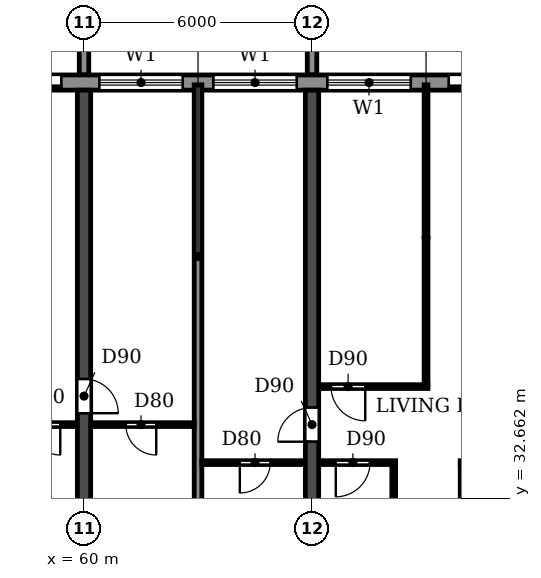
"""IFC4 building model, lengths in metres.
Left out: names, types, materials, properties, quantities, classifications, styles, units other than length and angle.
Written with IfcOpenShell. Run it as: python <this file> out.ifc"""

import sys

from ifc_helpers import new_model, si_unit, direction, frame, frame_2d, origin, place, context, subcontext, project, spatial, polyline, rectangle, outline, extrude, source, transform, mapped, element, fill, save


model = new_model("IFC4")
c1 = context("Model", 3, precision=1e-05, world=origin(), true_north=direction((0.0, 1.0)))
c2 = subcontext(c1, "Body", "Model", "MODEL_VIEW")
j1 = project(units=[si_unit("LENGTHUNIT", "METRE"), si_unit("PLANEANGLEUNIT", "RADIAN")], contexts=[c1])
p1 = place(None, origin())
s1 = spatial("IfcSite", under=j1, at=p1, CompositionType="ELEMENT")
p2 = place(p1, origin())
s2 = spatial("IfcBuilding", under=s1, at=p2, CompositionType="ELEMENT")
p3 = place(p2, frame((0.0, 0.0, 72.9)))
s3 = spatial("IfcBuildingStorey", under=s2, at=p3, CompositionType="ELEMENT", Elevation=72.9)
p4 = place(p3, frame((60.0, 30.525, 0.0), z_axis=(0.0, 0.0, 1.0), x_axis=(0.0, 1.0, 0.0)))
e1 = element("IfcWall", 1, at=p4, inside=s3, PredefinedType="SHEAR", context=c2, shape_type="SweptSolid", body=[
    extrude(rectangle(XDim=12.875, YDim=0.35, at=frame_2d((6.438, 0.0))), origin(), (0.0, 0.0, 1.0), 3.06),
])
p5 = place(p4, frame((4.375, 0.0, 0.0)))
e2 = element("IfcOpeningElement", 2, at=p5, cuts=e1, PredefinedType="OPENING", context=c2, shape_type="SweptSolid", body=[
    extrude(rectangle(XDim=0.9, YDim=2.1, at=frame_2d((0.45, 1.05))), frame((0.0, 0.185, 0.0), z_axis=(0.0, -1.0, 0.0), x_axis=(1.0, 0.0, 0.0)), (0.0, 0.0, 1.0), 0.37),
])
p6 = place(p3, frame((66.0, 30.525, 0.0), z_axis=(0.0, 0.0, 1.0), x_axis=(0.0, 1.0, 0.0)))
e3 = element("IfcWall", 3, at=p6, inside=s3, PredefinedType="SHEAR", context=c2, shape_type="SweptSolid", body=[
    extrude(rectangle(XDim=12.875, YDim=0.35, at=frame_2d((6.438, 0.0))), origin(), (0.0, 0.0, 1.0), 3.06),
])
p7 = place(p6, frame((3.625, 0.0, 0.0)))
e4 = element("IfcOpeningElement", 4, at=p7, cuts=e3, PredefinedType="OPENING", context=c2, shape_type="SweptSolid", body=[
    extrude(rectangle(XDim=0.9, YDim=2.1, at=frame_2d((0.45, 1.05))), frame((0.0, 0.185, 0.0), z_axis=(0.0, -1.0, 0.0), x_axis=(1.0, 0.0, 0.0)), (0.0, 0.0, 1.0), 0.37),
])
p8 = place(p3, frame((91.317, 43.6, 0.0), z_axis=(0.0, 0.0, 1.0), x_axis=(-1.0, 0.0, 0.0)))
e5 = element("IfcWall", 5, at=p8, inside=s3, PredefinedType="STANDARD", context=c2, shape_type="SweptSolid", body=[
    extrude(rectangle(XDim=80.634, YDim=0.4, at=frame_2d((40.317, 0.0))), origin(), (0.0, 0.0, 1.0), 3.06),
])
p9 = place(p8, frame((76.717, 0.0, 0.9)))
e6 = element("IfcOpeningElement", 6, at=p9, cuts=e5, PredefinedType="OPENING", context=c2, shape_type="SweptSolid", body=[
    extrude(rectangle(XDim=2.2, YDim=1.5, at=frame_2d((1.1, 0.75))), frame((0.0, 0.21, 0.0), z_axis=(0.0, -1.0, 0.0), x_axis=(1.0, 0.0, 0.0)), (0.0, 0.0, 1.0), 0.42),
])
p10 = place(p8, frame((73.917, 0.0, 0.0)))
e7 = element("IfcOpeningElement", 7, at=p10, cuts=e5, PredefinedType="OPENING", context=c2, shape_type="SweptSolid", body=[
    extrude(rectangle(XDim=1.8, YDim=2.4, at=frame_2d((0.9, 1.2))), frame((0.0, 0.21, 0.0), z_axis=(0.0, -1.0, 0.0), x_axis=(1.0, 0.0, 0.0)), (0.0, 0.0, 1.0), 0.42),
])
p11 = place(p8, frame((70.917, 0.0, 0.0)))
e8 = element("IfcOpeningElement", 8, at=p11, cuts=e5, PredefinedType="OPENING", context=c2, shape_type="SweptSolid", body=[
    extrude(rectangle(XDim=1.8, YDim=2.4, at=frame_2d((0.9, 1.2))), frame((0.0, 0.21, 0.0), z_axis=(0.0, -1.0, 0.0), x_axis=(1.0, 0.0, 0.0)), (0.0, 0.0, 1.0), 0.42),
])
p12 = place(p8, frame((67.717, 0.0, 0.9)))
e9 = element("IfcOpeningElement", 9, at=p12, cuts=e5, PredefinedType="OPENING", context=c2, shape_type="SweptSolid", body=[
    extrude(rectangle(XDim=2.2, YDim=1.5, at=frame_2d((1.1, 0.75))), frame((0.0, 0.21, 0.0), z_axis=(0.0, -1.0, 0.0), x_axis=(1.0, 0.0, 0.0)), (0.0, 0.0, 1.0), 0.42),
])
p13 = place(p8, frame((64.717, 0.0, 0.9)))
e10 = element("IfcOpeningElement", 10, at=p13, cuts=e5, PredefinedType="OPENING", context=c2, shape_type="SweptSolid", body=[
    extrude(rectangle(XDim=2.2, YDim=1.5, at=frame_2d((1.1, 0.75))), frame((0.0, 0.21, 0.0), z_axis=(0.0, -1.0, 0.0), x_axis=(1.0, 0.0, 0.0)), (0.0, 0.0, 1.0), 0.42),
])
p14 = place(p8, frame((61.917, 0.0, 0.0)))
e11 = element("IfcOpeningElement", 11, at=p14, cuts=e5, PredefinedType="OPENING", context=c2, shape_type="SweptSolid", body=[
    extrude(rectangle(XDim=1.8, YDim=2.4, at=frame_2d((0.9, 1.2))), frame((0.0, 0.21, 0.0), z_axis=(0.0, -1.0, 0.0), x_axis=(1.0, 0.0, 0.0)), (0.0, 0.0, 1.0), 0.42),
])
p15 = place(p8, frame((58.717, 0.0, 0.9)))
e12 = element("IfcOpeningElement", 12, at=p15, cuts=e5, PredefinedType="OPENING", context=c2, shape_type="SweptSolid", body=[
    extrude(rectangle(XDim=2.2, YDim=1.5, at=frame_2d((1.1, 0.75))), frame((0.0, 0.21, 0.0), z_axis=(0.0, -1.0, 0.0), x_axis=(1.0, 0.0, 0.0)), (0.0, 0.0, 1.0), 0.42),
])
p16 = place(p8, frame((55.917, 0.0, 0.0)))
e13 = element("IfcOpeningElement", 13, at=p16, cuts=e5, PredefinedType="OPENING", context=c2, shape_type="SweptSolid", body=[
    extrude(rectangle(XDim=1.8, YDim=2.4, at=frame_2d((0.9, 1.2))), frame((0.0, 0.21, 0.0), z_axis=(0.0, -1.0, 0.0), x_axis=(1.0, 0.0, 0.0)), (0.0, 0.0, 1.0), 0.42),
])
p17 = place(p8, frame((52.717, 0.0, 0.9)))
e14 = element("IfcOpeningElement", 14, at=p17, cuts=e5, PredefinedType="OPENING", context=c2, shape_type="SweptSolid", body=[
    extrude(rectangle(XDim=2.2, YDim=1.5, at=frame_2d((1.1, 0.75))), frame((0.0, 0.21, 0.0), z_axis=(0.0, -1.0, 0.0), x_axis=(1.0, 0.0, 0.0)), (0.0, 0.0, 1.0), 0.42),
])
p18 = place(p8, frame((49.717, 0.0, 0.9)))
e15 = element("IfcOpeningElement", 15, at=p18, cuts=e5, PredefinedType="OPENING", context=c2, shape_type="SweptSolid", body=[
    extrude(rectangle(XDim=2.2, YDim=1.5, at=frame_2d((1.1, 0.75))), frame((0.0, 0.21, 0.0), z_axis=(0.0, -1.0, 0.0), x_axis=(1.0, 0.0, 0.0)), (0.0, 0.0, 1.0), 0.42),
])
p19 = place(p8, frame((46.917, 0.0, 0.0)))
e16 = element("IfcOpeningElement", 16, at=p19, cuts=e5, PredefinedType="OPENING", context=c2, shape_type="SweptSolid", body=[
    extrude(rectangle(XDim=1.8, YDim=2.4, at=frame_2d((0.9, 1.2))), frame((0.0, 0.21, 0.0), z_axis=(0.0, -1.0, 0.0), x_axis=(1.0, 0.0, 0.0)), (0.0, 0.0, 1.0), 0.42),
])
p20 = place(p8, frame((43.717, 0.0, 0.9)))
e17 = element("IfcOpeningElement", 17, at=p20, cuts=e5, PredefinedType="OPENING", context=c2, shape_type="SweptSolid", body=[
    extrude(rectangle(XDim=2.2, YDim=1.5, at=frame_2d((1.1, 0.75))), frame((0.0, 0.21, 0.0), z_axis=(0.0, -1.0, 0.0), x_axis=(1.0, 0.0, 0.0)), (0.0, 0.0, 1.0), 0.42),
])
p21 = place(p8, frame((40.717, 0.0, 0.9)))
e18 = element("IfcOpeningElement", 18, at=p21, cuts=e5, PredefinedType="OPENING", context=c2, shape_type="SweptSolid", body=[
    extrude(rectangle(XDim=2.2, YDim=1.5, at=frame_2d((1.1, 0.75))), frame((0.0, 0.21, 0.0), z_axis=(0.0, -1.0, 0.0), x_axis=(1.0, 0.0, 0.0)), (0.0, 0.0, 1.0), 0.42),
])
p22 = place(p8, frame((37.917, 0.0, 0.0)))
e19 = element("IfcOpeningElement", 19, at=p22, cuts=e5, PredefinedType="OPENING", context=c2, shape_type="SweptSolid", body=[
    extrude(rectangle(XDim=1.8, YDim=2.4, at=frame_2d((0.9, 1.2))), frame((0.0, 0.21, 0.0), z_axis=(0.0, -1.0, 0.0), x_axis=(1.0, 0.0, 0.0)), (0.0, 0.0, 1.0), 0.42),
])
p23 = place(p8, frame((34.717, 0.0, 0.9)))
e20 = element("IfcOpeningElement", 20, at=p23, cuts=e5, PredefinedType="OPENING", context=c2, shape_type="SweptSolid", body=[
    extrude(rectangle(XDim=2.2, YDim=1.5, at=frame_2d((1.1, 0.75))), frame((0.0, 0.21, 0.0), z_axis=(0.0, -1.0, 0.0), x_axis=(1.0, 0.0, 0.0)), (0.0, 0.0, 1.0), 0.42),
])
p24 = place(p8, frame((31.917, 0.0, 0.0)))
e21 = element("IfcOpeningElement", 21, at=p24, cuts=e5, PredefinedType="OPENING", context=c2, shape_type="SweptSolid", body=[
    extrude(rectangle(XDim=1.8, YDim=2.4, at=frame_2d((0.9, 1.2))), frame((0.0, 0.21, 0.0), z_axis=(0.0, -1.0, 0.0), x_axis=(1.0, 0.0, 0.0)), (0.0, 0.0, 1.0), 0.42),
])
p25 = place(p8, frame((28.717, 0.0, 0.9)))
e22 = element("IfcOpeningElement", 22, at=p25, cuts=e5, PredefinedType="OPENING", context=c2, shape_type="SweptSolid", body=[
    extrude(rectangle(XDim=2.2, YDim=1.5, at=frame_2d((1.1, 0.75))), frame((0.0, 0.21, 0.0), z_axis=(0.0, -1.0, 0.0), x_axis=(1.0, 0.0, 0.0)), (0.0, 0.0, 1.0), 0.42),
])
p26 = place(p8, frame((25.717, 0.0, 0.9)))
e23 = element("IfcOpeningElement", 23, at=p26, cuts=e5, PredefinedType="OPENING", context=c2, shape_type="SweptSolid", body=[
    extrude(rectangle(XDim=2.2, YDim=1.5, at=frame_2d((1.1, 0.75))), frame((0.0, 0.21, 0.0), z_axis=(0.0, -1.0, 0.0), x_axis=(1.0, 0.0, 0.0)), (0.0, 0.0, 1.0), 0.42),
])
p27 = place(p8, frame((22.717, 0.0, 0.9)))
e24 = element("IfcOpeningElement", 24, at=p27, cuts=e5, PredefinedType="OPENING", context=c2, shape_type="SweptSolid", body=[
    extrude(rectangle(XDim=2.2, YDim=1.5, at=frame_2d((1.1, 0.75))), frame((0.0, 0.21, 0.0), z_axis=(0.0, -1.0, 0.0), x_axis=(1.0, 0.0, 0.0)), (0.0, 0.0, 1.0), 0.42),
])
p28 = place(p8, frame((19.917, 0.0, 0.0)))
e25 = element("IfcOpeningElement", 25, at=p28, cuts=e5, PredefinedType="OPENING", context=c2, shape_type="SweptSolid", body=[
    extrude(rectangle(XDim=1.8, YDim=2.4, at=frame_2d((0.9, 1.2))), frame((0.0, 0.21, 0.0), z_axis=(0.0, -1.0, 0.0), x_axis=(1.0, 0.0, 0.0)), (0.0, 0.0, 1.0), 0.42),
])
p29 = place(p8, frame((16.717, 0.0, 0.9)))
e26 = element("IfcOpeningElement", 26, at=p29, cuts=e5, PredefinedType="OPENING", context=c2, shape_type="SweptSolid", body=[
    extrude(rectangle(XDim=2.2, YDim=1.5, at=frame_2d((1.1, 0.75))), frame((0.0, 0.21, 0.0), z_axis=(0.0, -1.0, 0.0), x_axis=(1.0, 0.0, 0.0)), (0.0, 0.0, 1.0), 0.42),
])
p30 = place(p8, frame((13.717, 0.0, 0.9)))
e27 = element("IfcOpeningElement", 27, at=p30, cuts=e5, PredefinedType="OPENING", context=c2, shape_type="SweptSolid", body=[
    extrude(rectangle(XDim=2.2, YDim=1.5, at=frame_2d((1.1, 0.75))), frame((0.0, 0.21, 0.0), z_axis=(0.0, -1.0, 0.0), x_axis=(1.0, 0.0, 0.0)), (0.0, 0.0, 1.0), 0.42),
])
p31 = place(p8, frame((10.717, 0.0, 0.9)))
e28 = element("IfcOpeningElement", 28, at=p31, cuts=e5, PredefinedType="OPENING", context=c2, shape_type="SweptSolid", body=[
    extrude(rectangle(XDim=2.2, YDim=1.5, at=frame_2d((1.1, 0.75))), frame((0.0, 0.21, 0.0), z_axis=(0.0, -1.0, 0.0), x_axis=(1.0, 0.0, 0.0)), (0.0, 0.0, 1.0), 0.42),
])
p32 = place(p8, frame((7.917, 0.0, 0.0)))
e29 = element("IfcOpeningElement", 29, at=p32, cuts=e5, PredefinedType="OPENING", context=c2, shape_type="SweptSolid", body=[
    extrude(rectangle(XDim=1.8, YDim=2.4, at=frame_2d((0.9, 1.2))), frame((0.0, 0.21, 0.0), z_axis=(0.0, -1.0, 0.0), x_axis=(1.0, 0.0, 0.0)), (0.0, 0.0, 1.0), 0.42),
])
p33 = place(p8, frame((4.717, 0.0, 0.9)))
e30 = element("IfcOpeningElement", 30, at=p33, cuts=e5, PredefinedType="OPENING", context=c2, shape_type="SweptSolid", body=[
    extrude(rectangle(XDim=2.2, YDim=1.5, at=frame_2d((1.1, 0.75))), frame((0.0, 0.21, 0.0), z_axis=(0.0, -1.0, 0.0), x_axis=(1.0, 0.0, 0.0)), (0.0, 0.0, 1.0), 0.42),
])
p34 = place(p8, frame((1.917, 0.0, 0.0)))
e31 = element("IfcOpeningElement", 31, at=p34, cuts=e5, PredefinedType="OPENING", context=c2, shape_type="SweptSolid", body=[
    extrude(rectangle(XDim=1.8, YDim=2.4, at=frame_2d((0.9, 1.2))), frame((0.0, 0.21, 0.0), z_axis=(0.0, -1.0, 0.0), x_axis=(1.0, 0.0, 0.0)), (0.0, 0.0, 1.0), 0.42),
])
m1 = source(origin(), c2, "Body", "SweptSolid", [
    extrude(outline(polyline([(0.0, 0.0), (0.25, 0.0), (0.25, 3.1), (0.0, 3.1), (0.0, 0.0)])), origin(), (0.0, 0.0, 1.0), 3.1),
])
for number, where in (
    (32, (59.875, 43.8, 0.0)),
    (33, (65.875, 43.8, 0.0)),
):
    element("IfcWall", number, at=place(p3, frame(where)), inside=s3, PredefinedType="STANDARD", context=c2, shape_type="MappedRepresentation", body=[
        mapped(m1, transform((0.0, 0.0, 0.0))),
    ])
p35 = place(p3, frame((63.0, 30.535, 0.0), z_axis=(0.0, 0.0, 1.0), x_axis=(0.0, 1.0, 0.0)))
e34 = element("IfcWall", 34, at=p35, inside=s3, PredefinedType="PARTITIONING", context=c2, shape_type="SweptSolid", body=[
    extrude(rectangle(XDim=13.005, YDim=0.2, at=frame_2d((6.502, 0.0))), origin(), (0.0, 0.0, 1.0), 3.06),
])
p36 = place(p3, frame((63.1, 33.6, 0.0), z_axis=(0.0, 0.0, 1.0), x_axis=(1.0, 0.0, 0.0)))
e35 = element("IfcWall", 35, at=p36, inside=s3, PredefinedType="PARTITIONING", context=c2, shape_type="SweptSolid", body=[
    extrude(rectangle(XDim=2.715, YDim=0.1, at=frame_2d((1.357, 0.0))), origin(), (0.0, 0.0, 1.0), 3.06),
])
p37 = place(p36, frame((1.0, 0.0, 0.0)))
e36 = element("IfcOpeningElement", 36, at=p37, cuts=e35, PredefinedType="OPENING", context=c2, shape_type="SweptSolid", body=[
    extrude(rectangle(XDim=0.8, YDim=2.1, at=frame_2d((0.4, 1.05))), frame((0.0, 0.06, 0.0), z_axis=(0.0, -1.0, 0.0), x_axis=(1.0, 0.0, 0.0)), (0.0, 0.0, 1.0), 0.12),
])
p38 = place(p3, frame((66.185, 33.6, 0.0), z_axis=(0.0, 0.0, 1.0), x_axis=(1.0, 0.0, 0.0)))
e37 = element("IfcWall", 37, at=p38, inside=s3, PredefinedType="PARTITIONING", context=c2, shape_type="SweptSolid", body=[
    extrude(rectangle(XDim=2.015, YDim=0.1, at=frame_2d((1.007, 0.0))), origin(), (0.0, 0.0, 1.0), 3.06),
])
p39 = place(p38, frame((0.44, 0.0, 0.0)))
e38 = element("IfcOpeningElement", 38, at=p39, cuts=e37, PredefinedType="OPENING", context=c2, shape_type="SweptSolid", body=[
    extrude(rectangle(XDim=0.9, YDim=2.1, at=frame_2d((0.45, 1.05))), frame((0.0, 0.06, 0.0), z_axis=(0.0, -1.0, 0.0), x_axis=(1.0, 0.0, 0.0)), (0.0, 0.0, 1.0), 0.12),
])
p40 = place(p3, frame((69.9, 33.6, 0.0), z_axis=(0.0, 0.0, 1.0), x_axis=(1.0, 0.0, 0.0)))
e39 = element("IfcWall", 39, at=p40, inside=s3, PredefinedType="PARTITIONING", context=c2, shape_type="SweptSolid", body=[
    extrude(rectangle(XDim=1.915, YDim=0.1, at=frame_2d((0.958, 0.0))), origin(), (0.0, 0.0, 1.0), 3.06),
])
p41 = place(p40, frame((0.675, 0.0, 0.0)))
e40 = element("IfcOpeningElement", 40, at=p41, cuts=e39, PredefinedType="OPENING", context=c2, shape_type="SweptSolid", body=[
    extrude(rectangle(XDim=0.8, YDim=2.1, at=frame_2d((0.4, 1.05))), frame((0.0, 0.06, 0.0), z_axis=(0.0, -1.0, 0.0), x_axis=(1.0, 0.0, 0.0)), (0.0, 0.0, 1.0), 0.12),
])
p42 = place(p3, frame((57.9, 34.6, 0.0), z_axis=(0.0, 0.0, 1.0), x_axis=(1.0, 0.0, 0.0)))
e41 = element("IfcWall", 41, at=p42, inside=s3, PredefinedType="PARTITIONING", context=c2, shape_type="SweptSolid", body=[
    extrude(rectangle(XDim=1.915, YDim=0.1, at=frame_2d((0.958, 0.0))), origin(), (0.0, 0.0, 1.0), 3.06),
])
p43 = place(p42, frame((0.675, 0.0, 0.0)))
e42 = element("IfcOpeningElement", 42, at=p43, cuts=e41, PredefinedType="OPENING", context=c2, shape_type="SweptSolid", body=[
    extrude(rectangle(XDim=0.8, YDim=2.1, at=frame_2d((0.4, 1.05))), frame((0.0, 0.06, 0.0), z_axis=(0.0, -1.0, 0.0), x_axis=(1.0, 0.0, 0.0)), (0.0, 0.0, 1.0), 0.12),
])
p44 = place(p3, frame((60.185, 34.6, 0.0), z_axis=(0.0, 0.0, 1.0), x_axis=(1.0, 0.0, 0.0)))
e43 = element("IfcWall", 43, at=p44, inside=s3, PredefinedType="PARTITIONING", context=c2, shape_type="SweptSolid", body=[
    extrude(rectangle(XDim=2.715, YDim=0.1, at=frame_2d((1.357, 0.0))), origin(), (0.0, 0.0, 1.0), 3.06),
])
p45 = place(p44, frame((0.915, 0.0, 0.0)))
e44 = element("IfcOpeningElement", 44, at=p45, cuts=e43, PredefinedType="OPENING", context=c2, shape_type="SweptSolid", body=[
    extrude(rectangle(XDim=0.8, YDim=2.1, at=frame_2d((0.4, 1.05))), frame((0.0, 0.06, 0.0), z_axis=(0.0, -1.0, 0.0), x_axis=(1.0, 0.0, 0.0)), (0.0, 0.0, 1.0), 0.12),
])
p46 = place(p3, frame((66.185, 35.6, 0.0), z_axis=(0.0, 0.0, 1.0), x_axis=(1.0, 0.0, 0.0)))
e45 = element("IfcWall", 45, at=p46, inside=s3, PredefinedType="PARTITIONING", context=c2, shape_type="SweptSolid", body=[
    extrude(rectangle(XDim=2.865, YDim=0.1, at=frame_2d((1.433, 0.0))), origin(), (0.0, 0.0, 1.0), 3.06),
])
p47 = place(p46, frame((0.315, 0.0, 0.0)))
e46 = element("IfcOpeningElement", 46, at=p47, cuts=e45, PredefinedType="OPENING", context=c2, shape_type="SweptSolid", body=[
    extrude(rectangle(XDim=0.9, YDim=2.1, at=frame_2d((0.45, 1.05))), frame((0.0, 0.06, 0.0), z_axis=(0.0, -1.0, 0.0), x_axis=(1.0, 0.0, 0.0)), (0.0, 0.0, 1.0), 0.12),
])
p48 = place(p3, frame((68.15, 30.535, 0.0), z_axis=(0.0, 0.0, 1.0), x_axis=(0.0, 1.0, 0.0)))
e47 = element("IfcWall", 47, at=p48, inside=s3, PredefinedType="PARTITIONING", context=c2, shape_type="SweptSolid", body=[
    extrude(rectangle(XDim=3.015, YDim=0.1, at=frame_2d((1.508, 0.0))), origin(), (0.0, 0.0, 1.0), 3.06),
])
p49 = place(p3, frame((69.0, 35.65, 0.0), z_axis=(0.0, 0.0, 1.0), x_axis=(0.0, 1.0, 0.0)))
e48 = element("IfcWall", 48, at=p49, inside=s3, PredefinedType="PARTITIONING", context=c2, shape_type="SweptSolid", body=[
    extrude(rectangle(XDim=7.89, YDim=0.1, at=frame_2d((3.945, 0.0))), origin(), (0.0, 0.0, 1.0), 3.06),
])
p50 = place(p3, frame((69.95, 30.535, 0.0), z_axis=(0.0, 0.0, 1.0), x_axis=(0.0, 1.0, 0.0)))
e49 = element("IfcWall", 49, at=p50, inside=s3, PredefinedType="PARTITIONING", context=c2, shape_type="SweptSolid", body=[
    extrude(rectangle(XDim=3.015, YDim=0.1, at=frame_2d((1.508, 0.0))), origin(), (0.0, 0.0, 1.0), 3.06),
])
p51 = place(p24, origin())
e50 = element("IfcDoor", 50, at=p51, inside=s3, OperationType="DOUBLE_DOOR_SLIDING", PredefinedType="DOOR", context=c2, shape_type="SweptSolid", body=[
    extrude(rectangle(XDim=1.8, YDim=2.4, at=frame_2d((0.9, 1.2))), frame((0.0, 0.025, 0.0), z_axis=(0.0, -1.0, 0.0), x_axis=(1.0, 0.0, 0.0)), (0.0, 0.0, 1.0), 0.05),
])
fill(e21, e50)
p52 = place(p25, origin())
e51 = element("IfcWindow", 51, at=p52, inside=s3, PartitioningType="DOUBLE_PANEL_HORIZONTAL", PredefinedType="WINDOW", context=c2, shape_type="SweptSolid", body=[
    extrude(rectangle(XDim=2.2, YDim=1.5, at=frame_2d((1.1, 0.75))), frame((0.0, 0.03, 0.0), z_axis=(0.0, -1.0, 0.0), x_axis=(1.0, 0.0, 0.0)), (0.0, 0.0, 1.0), 0.06),
])
fill(e22, e51)
p53 = place(p26, origin())
e52 = element("IfcWindow", 52, at=p53, inside=s3, PartitioningType="DOUBLE_PANEL_HORIZONTAL", PredefinedType="WINDOW", context=c2, shape_type="SweptSolid", body=[
    extrude(rectangle(XDim=2.2, YDim=1.5, at=frame_2d((1.1, 0.75))), frame((0.0, 0.03, 0.0), z_axis=(0.0, -1.0, 0.0), x_axis=(1.0, 0.0, 0.0)), (0.0, 0.0, 1.0), 0.06),
])
fill(e23, e52)
p54 = place(p27, origin())
e53 = element("IfcWindow", 53, at=p54, inside=s3, PartitioningType="DOUBLE_PANEL_HORIZONTAL", PredefinedType="WINDOW", context=c2, shape_type="SweptSolid", body=[
    extrude(rectangle(XDim=2.2, YDim=1.5, at=frame_2d((1.1, 0.75))), frame((0.0, 0.03, 0.0), z_axis=(0.0, -1.0, 0.0), x_axis=(1.0, 0.0, 0.0)), (0.0, 0.0, 1.0), 0.06),
])
fill(e24, e53)
p55 = place(p28, origin())
e54 = element("IfcDoor", 54, at=p55, inside=s3, OperationType="DOUBLE_DOOR_SLIDING", PredefinedType="DOOR", context=c2, shape_type="SweptSolid", body=[
    extrude(rectangle(XDim=1.8, YDim=2.4, at=frame_2d((0.9, 1.2))), frame((0.0, 0.025, 0.0), z_axis=(0.0, -1.0, 0.0), x_axis=(1.0, 0.0, 0.0)), (0.0, 0.0, 1.0), 0.05),
])
fill(e25, e54)
p56 = place(p45, frame((0.8, 0.0, 0.0), z_axis=(0.0, 0.0, 1.0), x_axis=(-1.0, 0.0, 0.0)))
e55 = element("IfcDoor", 55, at=p56, inside=s3, OperationType="SINGLE_SWING_LEFT", PredefinedType="DOOR", context=c2, shape_type="SweptSolid", body=[
    extrude(rectangle(XDim=0.8, YDim=2.1, at=frame_2d((0.4, 1.05))), frame((0.0, 0.025, 0.0), z_axis=(0.0, -1.0, 0.0), x_axis=(1.0, 0.0, 0.0)), (0.0, 0.0, 1.0), 0.05),
])
fill(e44, e55)
p57 = place(p43, frame((0.8, 0.0, 0.0), z_axis=(0.0, 0.0, 1.0), x_axis=(-1.0, 0.0, 0.0)))
e56 = element("IfcDoor", 56, at=p57, inside=s3, OperationType="SINGLE_SWING_LEFT", PredefinedType="DOOR", context=c2, shape_type="SweptSolid", body=[
    extrude(rectangle(XDim=0.8, YDim=2.1, at=frame_2d((0.4, 1.05))), frame((0.0, 0.025, 0.0), z_axis=(0.0, -1.0, 0.0), x_axis=(1.0, 0.0, 0.0)), (0.0, 0.0, 1.0), 0.05),
])
fill(e42, e56)
p58 = place(p5, frame((0.9, 0.0, 0.0), z_axis=(0.0, 0.0, 1.0), x_axis=(-1.0, 0.0, 0.0)))
e57 = element("IfcDoor", 57, at=p58, inside=s3, OperationType="SINGLE_SWING_RIGHT", PredefinedType="DOOR", context=c2, shape_type="SweptSolid", body=[
    extrude(rectangle(XDim=0.9, YDim=2.1, at=frame_2d((0.45, 1.05))), frame((0.0, 0.025, 0.0), z_axis=(0.0, -1.0, 0.0), x_axis=(1.0, 0.0, 0.0)), (0.0, 0.0, 1.0), 0.05),
])
fill(e2, e57)
p59 = place(p37, frame((0.8, 0.0, 0.0), z_axis=(0.0, 0.0, 1.0), x_axis=(-1.0, 0.0, 0.0)))
e58 = element("IfcDoor", 58, at=p59, inside=s3, OperationType="SINGLE_SWING_RIGHT", PredefinedType="DOOR", context=c2, shape_type="SweptSolid", body=[
    extrude(rectangle(XDim=0.8, YDim=2.1, at=frame_2d((0.4, 1.05))), frame((0.0, 0.025, 0.0), z_axis=(0.0, -1.0, 0.0), x_axis=(1.0, 0.0, 0.0)), (0.0, 0.0, 1.0), 0.05),
])
fill(e36, e58)
p60 = place(p7, origin())
e59 = element("IfcDoor", 59, at=p60, inside=s3, OperationType="SINGLE_SWING_LEFT", PredefinedType="DOOR", context=c2, shape_type="SweptSolid", body=[
    extrude(rectangle(XDim=0.9, YDim=2.1, at=frame_2d((0.45, 1.05))), frame((0.0, 0.025, 0.0), z_axis=(0.0, -1.0, 0.0), x_axis=(1.0, 0.0, 0.0)), (0.0, 0.0, 1.0), 0.05),
])
fill(e4, e59)
p61 = place(p47, frame((0.9, 0.0, 0.0), z_axis=(0.0, 0.0, 1.0), x_axis=(-1.0, 0.0, 0.0)))
e60 = element("IfcDoor", 60, at=p61, inside=s3, OperationType="SINGLE_SWING_LEFT", PredefinedType="DOOR", context=c2, shape_type="SweptSolid", body=[
    extrude(rectangle(XDim=0.9, YDim=2.1, at=frame_2d((0.45, 1.05))), frame((0.0, 0.025, 0.0), z_axis=(0.0, -1.0, 0.0), x_axis=(1.0, 0.0, 0.0)), (0.0, 0.0, 1.0), 0.05),
])
fill(e46, e60)
p62 = place(p39, frame((0.9, 0.0, 0.0), z_axis=(0.0, 0.0, 1.0), x_axis=(-1.0, 0.0, 0.0)))
e61 = element("IfcDoor", 61, at=p62, inside=s3, OperationType="SINGLE_SWING_RIGHT", PredefinedType="DOOR", context=c2, shape_type="SweptSolid", body=[
    extrude(rectangle(XDim=0.9, YDim=2.1, at=frame_2d((0.45, 1.05))), frame((0.0, 0.025, 0.0), z_axis=(0.0, -1.0, 0.0), x_axis=(1.0, 0.0, 0.0)), (0.0, 0.0, 1.0), 0.05),
])
fill(e38, e61)
save(model, sys.argv[1])
